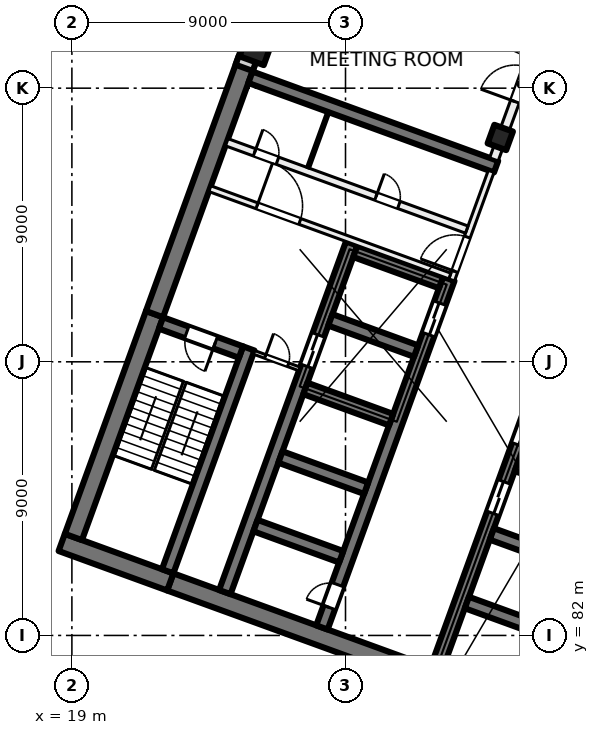
"""IFC4 building model, lengths in metres.
Left out: names, types, materials, properties, quantities, classifications, styles, units other than length and angle.
Written with IfcOpenShell. Run it as: python <this file> out.ifc"""

import sys

from ifc_helpers import new_model, si_unit, direction, frame, frame_2d, origin, origin_2d, place, context, subcontext, project, spatial, rectangle, extrude, element, fill, save


model = new_model("IFC4")
c1 = context("Model", 3, precision=1e-05, world=origin(), true_north=direction((0.0, 1.0)))
c2 = subcontext(c1, "Body", "Model", "MODEL_VIEW")
j1 = project(units=[si_unit("LENGTHUNIT", "METRE"), si_unit("PLANEANGLEUNIT", "RADIAN")], contexts=[c1])
p1 = place(None, origin())
s1 = spatial("IfcSite", under=j1, at=p1, CompositionType="ELEMENT")
p2 = place(p1, origin())
s2 = spatial("IfcBuilding", under=s1, at=p2, CompositionType="ELEMENT")
p3 = place(p2, frame((0.0, 0.0, 81.0)))
s3 = spatial("IfcBuildingStorey", under=s2, at=p3, CompositionType="ELEMENT", Elevation=81.0)
p4 = place(p3, frame((33.091, 98.379, 0.0), z_axis=(0.0, 0.0, 1.0), x_axis=(-0.342020143326, -0.939692620786, 0.0)))
e1 = element("IfcColumn", 1, at=p4, inside=s3, PredefinedType="COLUMN", context=c2, shape_type="SweptSolid", body=[
    extrude(rectangle(XDim=0.65, YDim=0.65, at=origin_2d()), origin(), (0.0, 0.0, 1.0), 4.0),
])
p5 = place(p3, frame((25.056, 101.303, 0.0), z_axis=(0.0, 0.0, 1.0), x_axis=(-0.342020143326, -0.939692620786, 0.0)))
e2 = element("IfcColumn", 2, at=p5, inside=s3, PredefinedType="COLUMN", context=c2, shape_type="SweptSolid", body=[
    extrude(rectangle(XDim=0.85, YDim=0.85, at=origin_2d()), origin(), (0.0, 0.0, 1.0), 4.0),
])
p6 = place(p3, frame((35.767, 78.835, 0.0), z_axis=(0.0, 0.0, 1.0), x_axis=(-0.939692894512, 0.342019391267, 0.0)))
e3 = element("IfcWall", 3, at=p6, inside=s3, PredefinedType="SHEAR", context=c2, shape_type="SweptSolid", body=[
    extrude(rectangle(XDim=14.4, YDim=0.6, at=frame_2d((7.2, 0.0))), origin(), (0.0, 0.0, 1.0), 4.0),
])
p7 = place(p3, frame((22.236, 83.76, 0.0), z_axis=(0.0, 0.0, 1.0), x_axis=(-0.939680822529, 0.342052557032, 0.0)))
e4 = element("IfcWall", 4, at=p7, inside=s3, PredefinedType="SHEAR", context=c2, shape_type="SweptSolid", body=[
    extrude(rectangle(XDim=3.8, YDim=0.6, at=frame_2d((1.9, 0.0))), origin(), (0.0, 0.0, 1.0), 4.0),
])
p8 = place(p3, frame((19.05, 85.239, 0.0), z_axis=(0.0, 0.0, 1.0), x_axis=(0.342016982193, 0.939693771338, 0.0)))
e5 = element("IfcWall", 5, at=p8, inside=s3, PredefinedType="SHEAR", context=c2, shape_type="SweptSolid", body=[
    extrude(rectangle(XDim=7.8, YDim=0.6, at=frame_2d((3.9, 0.0))), origin(), (0.0, 0.0, 1.0), 4.0),
])
p9 = place(p3, frame((21.717, 92.568, 0.0), z_axis=(0.0, 0.0, 1.0), x_axis=(0.342017595281, 0.939693548195, 0.0)))
e6 = element("IfcWall", 6, at=p9, inside=s3, PredefinedType="SHEAR", context=c2, shape_type="SweptSolid", body=[
    extrude(rectangle(XDim=8.925, YDim=0.6, at=frame_2d((4.462, 0.0))), origin(), (0.0, 0.0, 1.0), 4.0),
])
p10 = place(p3, frame((22.15, 84.11, 0.0), z_axis=(0.0, 0.0, 1.0), x_axis=(0.342016982193, 0.939693771338, 0.0)))
e7 = element("IfcWall", 7, at=p10, inside=s3, PredefinedType="SHEAR", context=c2, shape_type="SweptSolid", body=[
    extrude(rectangle(XDim=7.8, YDim=0.4, at=frame_2d((3.9, 0.0))), origin(), (0.0, 0.0, 1.0), 4.0),
])
p11 = place(p3, frame((24.562, 91.32, 0.0), z_axis=(0.0, 0.0, 1.0), x_axis=(-0.939717030584, 0.341953070509, 0.0)))
e8 = element("IfcWall", 8, at=p11, inside=s3, PredefinedType="SHEAR", context=c2, shape_type="SweptSolid", body=[
    extrude(rectangle(XDim=2.8, YDim=0.4, at=frame_2d((1.4, 0.0))), origin(), (0.0, 0.0, 1.0), 4.0),
])
p12 = place(p11, frame((0.9, 0.0, 0.0)))
e9 = element("IfcOpeningElement", 9, at=p12, cuts=e8, PredefinedType="OPENING", context=c2, shape_type="SweptSolid", body=[
    extrude(rectangle(XDim=1.0, YDim=2.1, at=frame_2d((0.5, 1.05))), frame((0.0, 0.21, 0.0), z_axis=(0.0, -1.0, 0.0), x_axis=(1.0, 0.0, 0.0)), (0.0, 0.0, 1.0), 0.42),
])
p13 = place(p3, frame((30.984, 80.895, 0.0), z_axis=(0.0, 0.0, 1.0), x_axis=(0.342021021735, 0.939692301071, 0.0)))
e10 = element("IfcWall", 10, at=p13, inside=s3, PredefinedType="SHEAR", context=c2, shape_type="SweptSolid", body=[
    extrude(rectangle(XDim=12.2, YDim=0.4, at=frame_2d((6.1, 0.0))), origin(), (0.0, 0.0, 1.0), 4.0),
])
p14 = place(p13, frame((5.45, 0.0, 0.0)))
e11 = element("IfcOpeningElement", 11, at=p14, cuts=e10, PredefinedType="OPENING", context=c2, shape_type="SweptSolid", body=[
    extrude(rectangle(XDim=1.1, YDim=2.1, at=frame_2d((0.55, 1.05))), frame((0.0, 0.21, 0.0), z_axis=(0.0, -1.0, 0.0), x_axis=(1.0, 0.0, 0.0)), (0.0, 0.0, 1.0), 0.42),
])
p15 = place(p13, frame((7.85, 0.0, 0.0)))
e12 = element("IfcOpeningElement", 12, at=p15, cuts=e10, PredefinedType="OPENING", context=c2, shape_type="SweptSolid", body=[
    extrude(rectangle(XDim=1.1, YDim=2.1, at=frame_2d((0.55, 1.05))), frame((0.0, 0.21, 0.0), z_axis=(0.0, -1.0, 0.0), x_axis=(1.0, 0.0, 0.0)), (0.0, 0.0, 1.0), 0.42),
])
p16 = place(p13, frame((10.25, 0.0, 0.0)))
e13 = element("IfcOpeningElement", 13, at=p16, cuts=e10, PredefinedType="OPENING", context=c2, shape_type="SweptSolid", body=[
    extrude(rectangle(XDim=1.1, YDim=2.1, at=frame_2d((0.55, 1.05))), frame((0.0, 0.21, 0.0), z_axis=(0.0, -1.0, 0.0), x_axis=(1.0, 0.0, 0.0)), (0.0, 0.0, 1.0), 0.42),
])
for number, where, z_axis, x_axis in (
    (14, (34.812, 82.056, 0.0), (0.0, 0.0, 1.0), (-0.94, 0.342, 0.0)),
    (15, (35.632, 84.311, 0.0), (0.0, 0.0, 1.0), (-0.94, 0.342, 0.0)),
    (16, (36.453, 86.566, 0.0), (0.0, 0.0, 1.0), (-0.94, 0.342, 0.0)),
):
    element("IfcWall", number, at=place(p3, frame(where, z_axis=z_axis, x_axis=x_axis)), inside=s3, PredefinedType="SHEAR", context=c2, shape_type="SweptSolid", body=[
        extrude(rectangle(XDim=3.0, YDim=0.4, at=frame_2d((1.5, 0.0))), origin(), (0.0, 0.0, 1.0), 4.0),
    ])
p17 = place(p3, frame((27.225, 82.263, 0.0), z_axis=(0.0, 0.0, 1.0), x_axis=(0.342014590177, 0.939694641948, 0.0)))
e17 = element("IfcWall", 17, at=p17, inside=s3, PredefinedType="SHEAR", context=c2, shape_type="SweptSolid", body=[
    extrude(rectangle(XDim=12.2, YDim=0.4, at=frame_2d((6.1, 0.0))), origin(), (0.0, 0.0, 1.0), 4.0),
])
p18 = place(p17, frame((10.25, 0.0, 0.0)))
e18 = element("IfcOpeningElement", 18, at=p18, cuts=e17, PredefinedType="OPENING", context=c2, shape_type="SweptSolid", body=[
    extrude(rectangle(XDim=1.1, YDim=2.1, at=frame_2d((0.55, 1.05))), frame((0.0, 0.21, 0.0), z_axis=(0.0, -1.0, 0.0), x_axis=(1.0, 0.0, 0.0)), (0.0, 0.0, 1.0), 0.42),
])
p19 = place(p17, frame((0.7, 0.0, 0.0)))
e19 = element("IfcOpeningElement", 19, at=p19, cuts=e17, PredefinedType="OPENING", context=c2, shape_type="SweptSolid", body=[
    extrude(rectangle(XDim=0.8, YDim=2.1, at=frame_2d((0.4, 1.05))), frame((0.0, 0.21, 0.0), z_axis=(0.0, -1.0, 0.0), x_axis=(1.0, 0.0, 0.0)), (0.0, 0.0, 1.0), 0.42),
])
p20 = place(p3, frame((24.03, 83.426, 0.0), z_axis=(0.0, 0.0, 1.0), x_axis=(0.342014590177, 0.939694641948, 0.0)))
e20 = element("IfcWall", 20, at=p20, inside=s3, PredefinedType="SHEAR", context=c2, shape_type="SweptSolid", body=[
    extrude(rectangle(XDim=12.2, YDim=0.4, at=frame_2d((6.1, 0.0))), origin(), (0.0, 0.0, 1.0), 4.0),
])
p21 = place(p20, frame((7.9, 0.0, 0.0)))
e21 = element("IfcOpeningElement", 21, at=p21, cuts=e20, PredefinedType="OPENING", context=c2, shape_type="SweptSolid", body=[
    extrude(rectangle(XDim=1.1, YDim=2.1, at=frame_2d((0.55, 1.05))), frame((0.0, 0.21, 0.0), z_axis=(0.0, -1.0, 0.0), x_axis=(1.0, 0.0, 0.0)), (0.0, 0.0, 1.0), 0.42),
])
p22 = place(p3, frame((27.858, 84.587, 0.0), z_axis=(0.0, 0.0, 1.0), x_axis=(-0.939686455819, 0.342037080957, 0.0)))
e22 = element("IfcWall", 22, at=p22, inside=s3, PredefinedType="SHEAR", context=c2, shape_type="SweptSolid", body=[
    extrude(rectangle(XDim=3.0, YDim=0.4, at=frame_2d((1.5, 0.0))), origin(), (0.0, 0.0, 1.0), 4.0),
])
p23 = place(p3, frame((28.678, 86.842, 0.0), z_axis=(0.0, 0.0, 1.0), x_axis=(-0.939676934218, 0.342063238742, 0.0)))
e23 = element("IfcWall", 23, at=p23, inside=s3, PredefinedType="SHEAR", context=c2, shape_type="SweptSolid", body=[
    extrude(rectangle(XDim=3.0, YDim=0.4, at=frame_2d((1.5, 0.0))), origin(), (0.0, 0.0, 1.0), 4.0),
])
for number, where, z_axis, x_axis in (
    (24, (29.5, 89.097, 0.0), (0.0, 0.0, 1.0), (-0.94, 0.342, 0.0)),
    (25, (30.32, 91.353, 0.0), (0.0, 0.0, 1.0), (-0.94, 0.342, 0.0)),
    (26, (31.141, 93.608, 0.0), (0.0, 0.0, 1.0), (-0.94, 0.342, 0.0)),
):
    element("IfcWall", number, at=place(p3, frame(where, z_axis=z_axis, x_axis=x_axis)), inside=s3, PredefinedType="SHEAR", context=c2, shape_type="SweptSolid", body=[
        extrude(rectangle(XDim=3.0, YDim=0.4, at=frame_2d((1.5, 0.0))), origin(), (0.0, 0.0, 1.0), 4.0),
    ])
p24 = place(p3, frame((32.953, 97.418, 0.0), z_axis=(0.0, 0.0, 1.0), x_axis=(-0.93969060187, 0.342025690201, 0.0)))
e27 = element("IfcWall", 27, at=p24, inside=s3, PredefinedType="SHEAR", context=c2, shape_type="SweptSolid", body=[
    extrude(rectangle(XDim=8.6, YDim=0.4, at=frame_2d((4.3, 0.0))), origin(), (0.0, 0.0, 1.0), 4.0),
])
p25 = place(p3, frame((24.666, 100.669, 0.0), z_axis=(0.0, 0.0, 1.0), x_axis=(0.34201964167, 0.939692803373, 0.0)))
e28 = element("IfcWall", 28, at=p25, inside=s3, PredefinedType="SOLIDWALL", context=c2, shape_type="SweptSolid", body=[
    extrude(rectangle(XDim=32.884, YDim=0.6, at=frame_2d((16.442, 0.0))), origin(), (0.0, 0.0, 1.0), 3.625),
])
p26 = place(p25, frame((1.48, 0.0, 0.9)))
e29 = element("IfcOpeningElement", 29, at=p26, cuts=e28, PredefinedType="OPENING", context=c2, shape_type="SweptSolid", body=[
    extrude(rectangle(XDim=3.0, YDim=2.4, at=frame_2d((1.5, 1.2))), frame((0.0, 0.31, 0.0), z_axis=(0.0, -1.0, 0.0), x_axis=(1.0, 0.0, 0.0)), (0.0, 0.0, 1.0), 0.62),
])
p27 = place(p25, frame((5.98, 0.0, 0.9)))
e30 = element("IfcOpeningElement", 30, at=p27, cuts=e28, PredefinedType="OPENING", context=c2, shape_type="SweptSolid", body=[
    extrude(rectangle(XDim=3.0, YDim=2.4, at=frame_2d((1.5, 1.2))), frame((0.0, 0.31, 0.0), z_axis=(0.0, -1.0, 0.0), x_axis=(1.0, 0.0, 0.0)), (0.0, 0.0, 1.0), 0.62),
])
p28 = place(p25, frame((10.48, 0.0, 0.9)))
e31 = element("IfcOpeningElement", 31, at=p28, cuts=e28, PredefinedType="OPENING", context=c2, shape_type="SweptSolid", body=[
    extrude(rectangle(XDim=3.0, YDim=2.4, at=frame_2d((1.5, 1.2))), frame((0.0, 0.31, 0.0), z_axis=(0.0, -1.0, 0.0), x_axis=(1.0, 0.0, 0.0)), (0.0, 0.0, 1.0), 0.62),
])
p29 = place(p25, frame((14.98, 0.0, 0.9)))
e32 = element("IfcOpeningElement", 32, at=p29, cuts=e28, PredefinedType="OPENING", context=c2, shape_type="SweptSolid", body=[
    extrude(rectangle(XDim=3.0, YDim=2.4, at=frame_2d((1.5, 1.2))), frame((0.0, 0.31, 0.0), z_axis=(0.0, -1.0, 0.0), x_axis=(1.0, 0.0, 0.0)), (0.0, 0.0, 1.0), 0.62),
])
p30 = place(p25, frame((20.08, 0.0, 0.0)))
e33 = element("IfcOpeningElement", 33, at=p30, cuts=e28, PredefinedType="OPENING", context=c2, shape_type="SweptSolid", body=[
    extrude(rectangle(XDim=1.8, YDim=2.4, at=frame_2d((0.9, 1.2))), frame((0.0, 0.31, 0.0), z_axis=(0.0, -1.0, 0.0), x_axis=(1.0, 0.0, 0.0)), (0.0, 0.0, 1.0), 0.62),
])
p31 = place(p25, frame((23.98, 0.0, 0.9)))
e34 = element("IfcOpeningElement", 34, at=p31, cuts=e28, PredefinedType="OPENING", context=c2, shape_type="SweptSolid", body=[
    extrude(rectangle(XDim=3.0, YDim=2.4, at=frame_2d((1.5, 1.2))), frame((0.0, 0.31, 0.0), z_axis=(0.0, -1.0, 0.0), x_axis=(1.0, 0.0, 0.0)), (0.0, 0.0, 1.0), 0.62),
])
p32 = place(p25, frame((28.48, 0.0, 0.9)))
e35 = element("IfcOpeningElement", 35, at=p32, cuts=e28, PredefinedType="OPENING", context=c2, shape_type="SweptSolid", body=[
    extrude(rectangle(XDim=3.0, YDim=2.4, at=frame_2d((1.5, 1.2))), frame((0.0, 0.31, 0.0), z_axis=(0.0, -1.0, 0.0), x_axis=(1.0, 0.0, 0.0)), (0.0, 0.0, 1.0), 0.62),
])
p33 = place(p3, frame((31.491, 93.693, 0.0), z_axis=(0.0, 0.0, 1.0), x_axis=(0.341995824804, 0.939701471648, 0.0)))
e36 = element("IfcWall", 36, at=p33, inside=s3, PredefinedType="PARTITIONING", context=c2, shape_type="SweptSolid", body=[
    extrude(rectangle(XDim=3.8, YDim=0.2, at=frame_2d((1.9, 0.0))), origin(), (0.0, 0.0, 1.0), 3.625),
])
p34 = place(p33, frame((0.3, 0.0, 0.0)))
e37 = element("IfcOpeningElement", 37, at=p34, cuts=e36, PredefinedType="OPENING", context=c2, shape_type="SweptSolid", body=[
    extrude(rectangle(XDim=1.2, YDim=2.1, at=frame_2d((0.6, 1.05))), frame((0.0, 0.11, 0.0), z_axis=(0.0, -1.0, 0.0), x_axis=(1.0, 0.0, 0.0)), (0.0, 0.0, 1.0), 0.22),
])
p35 = place(p3, frame((23.538, 96.694, 0.0), z_axis=(0.0, 0.0, 1.0), x_axis=(0.939691552312, -0.342023078919, 0.0)))
e38 = element("IfcWall", 38, at=p35, inside=s3, PredefinedType="PARTITIONING", context=c2, shape_type="SweptSolid", body=[
    extrude(rectangle(XDim=8.4, YDim=0.2, at=frame_2d((4.2, 0.0))), origin(), (0.0, 0.0, 1.0), 3.625),
])
p36 = place(p35, frame((1.65, 0.0, 0.0)))
e39 = element("IfcOpeningElement", 39, at=p36, cuts=e38, PredefinedType="OPENING", context=c2, shape_type="SweptSolid", body=[
    extrude(rectangle(XDim=1.5, YDim=2.1, at=frame_2d((0.75, 1.05))), frame((0.0, 0.11, 0.0), z_axis=(0.0, -1.0, 0.0), x_axis=(1.0, 0.0, 0.0)), (0.0, 0.0, 1.0), 0.22),
])
p37 = place(p3, frame((24.094, 98.221, 0.0), z_axis=(0.0, 0.0, 1.0), x_axis=(0.939691552312, -0.342023078919, 0.0)))
e40 = element("IfcWall", 40, at=p37, inside=s3, PredefinedType="PARTITIONING", context=c2, shape_type="SweptSolid", body=[
    extrude(rectangle(XDim=8.4, YDim=0.25, at=frame_2d((4.2, 0.0))), origin(), (0.0, 0.0, 1.0), 3.625),
])
p38 = place(p37, frame((5.225, 0.0, 0.0)))
e41 = element("IfcOpeningElement", 41, at=p38, cuts=e40, PredefinedType="OPENING", context=c2, shape_type="SweptSolid", body=[
    extrude(rectangle(XDim=0.8, YDim=2.1, at=frame_2d((0.4, 1.05))), frame((0.0, 0.135, 0.0), z_axis=(0.0, -1.0, 0.0), x_axis=(1.0, 0.0, 0.0)), (0.0, 0.0, 1.0), 0.27),
])
p39 = place(p37, frame((0.975, 0.0, 0.0)))
e42 = element("IfcOpeningElement", 42, at=p39, cuts=e40, PredefinedType="OPENING", context=c2, shape_type="SweptSolid", body=[
    extrude(rectangle(XDim=0.8, YDim=2.1, at=frame_2d((0.4, 1.05))), frame((0.0, 0.135, 0.0), z_axis=(0.0, -1.0, 0.0), x_axis=(1.0, 0.0, 0.0)), (0.0, 0.0, 1.0), 0.27),
])
p40 = place(p3, frame((24.985, 91.312, 0.0), z_axis=(0.0, 0.0, 1.0), x_axis=(0.939708740826, -0.341975850632, 0.0)))
e43 = element("IfcWall", 43, at=p40, inside=s3, PredefinedType="PARTITIONING", context=c2, shape_type="SweptSolid", body=[
    extrude(rectangle(XDim=1.6, YDim=0.125, at=frame_2d((0.8, 0.0))), origin(), (0.0, 0.0, 1.0), 3.625),
])
p41 = place(p40, frame((0.4, 0.0, 0.0)))
e44 = element("IfcOpeningElement", 44, at=p41, cuts=e43, PredefinedType="OPENING", context=c2, shape_type="SweptSolid", body=[
    extrude(rectangle(XDim=0.8, YDim=2.1, at=frame_2d((0.4, 1.05))), frame((0.0, 0.073, 0.0), z_axis=(0.0, -1.0, 0.0), x_axis=(1.0, 0.0, 0.0)), (0.0, 0.0, 1.0), 0.145),
])
p42 = place(p3, frame((26.768, 97.381, 0.0), z_axis=(0.0, 0.0, 1.0), x_axis=(0.342024501273, 0.939691034611, 0.0)))
e45 = element("IfcWall", 45, at=p42, inside=s3, PredefinedType="PARTITIONING", context=c2, shape_type="SweptSolid", body=[
    extrude(rectangle(XDim=1.95, YDim=0.1, at=frame_2d((0.975, 0.0))), origin(), (0.0, 0.0, 1.0), 3.625),
])
p43 = place(p3, frame((32.881, 97.657, 0.0), z_axis=(0.0, 0.0, 1.0), x_axis=(0.342017360004, 0.939693633828, 0.0)))
e46 = element("IfcWall", 46, at=p43, inside=s3, PredefinedType="PARTITIONING", context=c2, shape_type="SweptSolid", body=[
    extrude(rectangle(XDim=34.516, YDim=0.3, at=frame_2d((17.258, 0.0))), origin(), (0.0, 0.0, 1.0), 3.625),
])
p44 = place(p43, frame((2.025, 0.0, 0.0)))
e47 = element("IfcOpeningElement", 47, at=p44, cuts=e46, PredefinedType="OPENING", context=c2, shape_type="SweptSolid", body=[
    extrude(rectangle(XDim=1.2, YDim=2.1, at=frame_2d((0.6, 1.05))), frame((0.0, 0.16, 0.0), z_axis=(0.0, -1.0, 0.0), x_axis=(1.0, 0.0, 0.0)), (0.0, 0.0, 1.0), 0.32),
])
p45 = place(p43, frame((7.0, 0.0, 0.0)))
e48 = element("IfcOpeningElement", 48, at=p45, cuts=e46, PredefinedType="OPENING", context=c2, shape_type="SweptSolid", body=[
    extrude(rectangle(XDim=1.0, YDim=2.1, at=frame_2d((0.5, 1.05))), frame((0.0, 0.16, 0.0), z_axis=(0.0, -1.0, 0.0), x_axis=(1.0, 0.0, 0.0)), (0.0, 0.0, 1.0), 0.32),
])
p46 = place(p43, frame((11.5, 0.0, 0.0)))
e49 = element("IfcOpeningElement", 49, at=p46, cuts=e46, PredefinedType="OPENING", context=c2, shape_type="SweptSolid", body=[
    extrude(rectangle(XDim=1.0, YDim=2.1, at=frame_2d((0.5, 1.05))), frame((0.0, 0.16, 0.0), z_axis=(0.0, -1.0, 0.0), x_axis=(1.0, 0.0, 0.0)), (0.0, 0.0, 1.0), 0.32),
])
p47 = place(p43, frame((16.0, 0.0, 0.0)))
e50 = element("IfcOpeningElement", 50, at=p47, cuts=e46, PredefinedType="OPENING", context=c2, shape_type="SweptSolid", body=[
    extrude(rectangle(XDim=1.0, YDim=2.1, at=frame_2d((0.5, 1.05))), frame((0.0, 0.16, 0.0), z_axis=(0.0, -1.0, 0.0), x_axis=(1.0, 0.0, 0.0)), (0.0, 0.0, 1.0), 0.32),
])
p48 = place(p43, frame((20.5, 0.0, 0.0)))
e51 = element("IfcOpeningElement", 51, at=p48, cuts=e46, PredefinedType="OPENING", context=c2, shape_type="SweptSolid", body=[
    extrude(rectangle(XDim=1.0, YDim=2.1, at=frame_2d((0.5, 1.05))), frame((0.0, 0.16, 0.0), z_axis=(0.0, -1.0, 0.0), x_axis=(1.0, 0.0, 0.0)), (0.0, 0.0, 1.0), 0.32),
])
p49 = place(p43, frame((25.0, 0.0, 0.0)))
e52 = element("IfcOpeningElement", 52, at=p49, cuts=e46, PredefinedType="OPENING", context=c2, shape_type="SweptSolid", body=[
    extrude(rectangle(XDim=1.0, YDim=2.1, at=frame_2d((0.5, 1.05))), frame((0.0, 0.16, 0.0), z_axis=(0.0, -1.0, 0.0), x_axis=(1.0, 0.0, 0.0)), (0.0, 0.0, 1.0), 0.32),
])
p50 = place(p43, frame((29.779, 0.0, 0.0)))
e53 = element("IfcOpeningElement", 53, at=p50, cuts=e46, PredefinedType="OPENING", context=c2, shape_type="SweptSolid", body=[
    extrude(rectangle(XDim=1.8, YDim=2.1, at=frame_2d((0.9, 1.05))), frame((0.0, 0.16, 0.0), z_axis=(0.0, -1.0, 0.0), x_axis=(1.0, 0.0, 0.0)), (0.0, 0.0, 1.0), 0.32),
])
p51 = place(p18, origin())
e54 = element("IfcDoor", 54, at=p51, inside=s3, OperationType="DOUBLE_DOOR_SLIDING", PredefinedType="DOOR", context=c2, shape_type="SweptSolid", body=[
    extrude(rectangle(XDim=1.1, YDim=2.1, at=frame_2d((0.55, 1.05))), frame((0.0, 0.025, 0.0), z_axis=(0.0, -1.0, 0.0), x_axis=(1.0, 0.0, 0.0)), (0.0, 0.0, 1.0), 0.05),
])
fill(e18, e54)
p52 = place(p14, origin())
e55 = element("IfcDoor", 55, at=p52, inside=s3, OperationType="DOUBLE_DOOR_SLIDING", PredefinedType="DOOR", context=c2, shape_type="SweptSolid", body=[
    extrude(rectangle(XDim=1.1, YDim=2.1, at=frame_2d((0.55, 1.05))), frame((0.0, 0.025, 0.0), z_axis=(0.0, -1.0, 0.0), x_axis=(1.0, 0.0, 0.0)), (0.0, 0.0, 1.0), 0.05),
])
fill(e11, e55)
p53 = place(p15, origin())
e56 = element("IfcDoor", 56, at=p53, inside=s3, OperationType="DOUBLE_DOOR_SLIDING", PredefinedType="DOOR", context=c2, shape_type="SweptSolid", body=[
    extrude(rectangle(XDim=1.1, YDim=2.1, at=frame_2d((0.55, 1.05))), frame((0.0, 0.025, 0.0), z_axis=(0.0, -1.0, 0.0), x_axis=(1.0, 0.0, 0.0)), (0.0, 0.0, 1.0), 0.05),
])
fill(e12, e56)
p54 = place(p19, origin())
e57 = element("IfcDoor", 57, at=p54, inside=s3, OperationType="SINGLE_SWING_LEFT", PredefinedType="DOOR", context=c2, shape_type="SweptSolid", body=[
    extrude(rectangle(XDim=0.8, YDim=2.1, at=frame_2d((0.4, 1.05))), frame((0.0, 0.025, 0.0), z_axis=(0.0, -1.0, 0.0), x_axis=(1.0, 0.0, 0.0)), (0.0, 0.0, 1.0), 0.05),
])
fill(e19, e57)
p55 = place(p34, origin())
e58 = element("IfcDoor", 58, at=p55, inside=s3, OperationType="DOUBLE_DOOR_SINGLE_SWING", PredefinedType="DOOR", context=c2, shape_type="SweptSolid", body=[
    extrude(rectangle(XDim=1.2, YDim=2.1, at=frame_2d((0.6, 1.05))), frame((0.0, 0.025, 0.0), z_axis=(0.0, -1.0, 0.0), x_axis=(1.0, 0.0, 0.0)), (0.0, 0.0, 1.0), 0.05),
])
fill(e37, e58)
p56 = place(p36, origin())
e59 = element("IfcDoor", 59, at=p56, inside=s3, OperationType="DOUBLE_DOOR_SINGLE_SWING", PredefinedType="DOOR", context=c2, shape_type="SweptSolid", body=[
    extrude(rectangle(XDim=1.5, YDim=2.1, at=frame_2d((0.75, 1.05))), frame((0.0, 0.025, 0.0), z_axis=(0.0, -1.0, 0.0), x_axis=(1.0, 0.0, 0.0)), (0.0, 0.0, 1.0), 0.05),
])
fill(e39, e59)
p57 = place(p12, origin())
e60 = element("IfcDoor", 60, at=p57, inside=s3, OperationType="SINGLE_SWING_LEFT", PredefinedType="DOOR", context=c2, shape_type="SweptSolid", body=[
    extrude(rectangle(XDim=1.0, YDim=2.1, at=frame_2d((0.5, 1.05))), frame((0.0, 0.025, 0.0), z_axis=(0.0, -1.0, 0.0), x_axis=(1.0, 0.0, 0.0)), (0.0, 0.0, 1.0), 0.05),
])
fill(e9, e60)
p58 = place(p41, origin())
e61 = element("IfcDoor", 61, at=p58, inside=s3, OperationType="SINGLE_SWING_RIGHT", PredefinedType="DOOR", context=c2, shape_type="SweptSolid", body=[
    extrude(rectangle(XDim=0.8, YDim=2.1, at=frame_2d((0.4, 1.05))), frame((0.0, 0.025, 0.0), z_axis=(0.0, -1.0, 0.0), x_axis=(1.0, 0.0, 0.0)), (0.0, 0.0, 1.0), 0.05),
])
fill(e44, e61)
p59 = place(p38, origin())
e62 = element("IfcDoor", 62, at=p59, inside=s3, OperationType="SINGLE_SWING_LEFT", PredefinedType="DOOR", context=c2, shape_type="SweptSolid", body=[
    extrude(rectangle(XDim=0.8, YDim=2.1, at=frame_2d((0.4, 1.05))), frame((0.0, 0.025, 0.0), z_axis=(0.0, -1.0, 0.0), x_axis=(1.0, 0.0, 0.0)), (0.0, 0.0, 1.0), 0.05),
])
fill(e41, e62)
p60 = place(p39, origin())
e63 = element("IfcDoor", 63, at=p60, inside=s3, OperationType="SINGLE_SWING_RIGHT", PredefinedType="DOOR", context=c2, shape_type="SweptSolid", body=[
    extrude(rectangle(XDim=0.8, YDim=2.1, at=frame_2d((0.4, 1.05))), frame((0.0, 0.025, 0.0), z_axis=(0.0, -1.0, 0.0), x_axis=(1.0, 0.0, 0.0)), (0.0, 0.0, 1.0), 0.05),
])
fill(e42, e63)
p61 = place(p21, origin())
e64 = element("IfcDoor", 64, at=p61, inside=s3, OperationType="DOUBLE_DOOR_SLIDING", PredefinedType="DOOR", context=c2, shape_type="SweptSolid", body=[
    extrude(rectangle(XDim=1.1, YDim=2.1, at=frame_2d((0.55, 1.05))), frame((0.0, 0.025, 0.0), z_axis=(0.0, -1.0, 0.0), x_axis=(1.0, 0.0, 0.0)), (0.0, 0.0, 1.0), 0.05),
])
fill(e21, e64)
p62 = place(p44, origin())
e65 = element("IfcDoor", 65, at=p62, inside=s3, OperationType="DOUBLE_DOOR_SINGLE_SWING", PredefinedType="DOOR", context=c2, shape_type="SweptSolid", body=[
    extrude(rectangle(XDim=1.2, YDim=2.1, at=frame_2d((0.6, 1.05))), frame((0.0, 0.025, 0.0), z_axis=(0.0, -1.0, 0.0), x_axis=(1.0, 0.0, 0.0)), (0.0, 0.0, 1.0), 0.05),
])
fill(e47, e65)
save(model, sys.argv[1])
